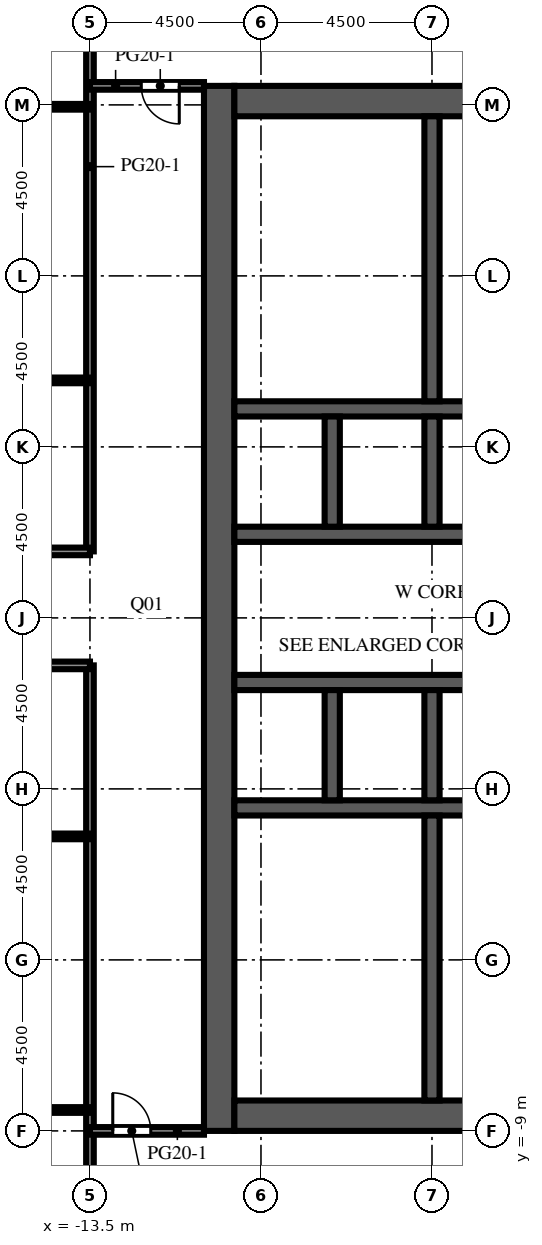
"""IFC4 building model, lengths in metres.
Left out: names, types, materials, properties, quantities, classifications, styles, units other than length and angle.
Written with IfcOpenShell. Run it as: python <this file> out.ifc"""

import sys

from ifc_helpers import new_model, si_unit, direction, frame, frame_2d, origin, place, context, subcontext, project, spatial, rectangle, extrude, element, fill, save


model = new_model("IFC4")
c1 = context("Model", 3, precision=1e-05, world=origin(), true_north=direction((0.0, 1.0)))
c2 = subcontext(c1, "Body", "Model", "MODEL_VIEW")
j1 = project(units=[si_unit("LENGTHUNIT", "METRE"), si_unit("PLANEANGLEUNIT", "RADIAN")], contexts=[c1])
p1 = place(None, origin())
s1 = spatial("IfcSite", under=j1, at=p1, CompositionType="ELEMENT")
p2 = place(p1, origin())
s2 = spatial("IfcBuilding", under=s1, at=p2, CompositionType="ELEMENT")
p3 = place(p2, frame((0.0, 0.0, 160.9)))
s3 = spatial("IfcBuildingStorey", under=s2, at=p3, CompositionType="ELEMENT", Elevation=160.9)
p4 = place(p3, frame((-10.1, -9.0, 0.0), z_axis=(0.0, 0.0, 1.0), x_axis=(0.0, 1.0, 0.0)))
e1 = element("IfcWall", 1, at=p4, inside=s3, PredefinedType="SHEAR", context=c2, shape_type="SweptSolid", body=[
    extrude(rectangle(XDim=27.5, YDim=0.8, at=frame_2d((13.75, 0.0))), origin(), (0.0, 0.0, 1.0), 4.1),
])
p5 = place(p4, frame((12.55, 0.0, 0.0)))
e2 = element("IfcOpeningElement", 2, at=p5, cuts=e1, PredefinedType="OPENING", context=c2, shape_type="SweptSolid", body=[
    extrude(rectangle(XDim=2.4, YDim=2.4, at=frame_2d((1.2, 1.2))), frame((0.0, 0.41, 0.0), z_axis=(0.0, -1.0, 0.0), x_axis=(1.0, 0.0, 0.0)), (0.0, 0.0, 1.0), 0.82),
])
p6 = place(p4, frame((6.825, 0.0, 0.0)))
e3 = element("IfcOpeningElement", 3, at=p6, cuts=e1, PredefinedType="OPENING", context=c2, shape_type="SweptSolid", body=[
    extrude(rectangle(XDim=1.2, YDim=2.1, at=frame_2d((0.6, 1.05))), frame((0.0, 0.41, 0.0), z_axis=(0.0, -1.0, 0.0), x_axis=(1.0, 0.0, 0.0)), (0.0, 0.0, 1.0), 0.82),
])
p7 = place(p4, frame((19.475, 0.0, 0.0)))
e4 = element("IfcOpeningElement", 4, at=p7, cuts=e1, PredefinedType="OPENING", context=c2, shape_type="SweptSolid", body=[
    extrude(rectangle(XDim=1.2, YDim=2.1, at=frame_2d((0.6, 1.05))), frame((0.0, 0.41, 0.0), z_axis=(0.0, -1.0, 0.0), x_axis=(1.0, 0.0, 0.0)), (0.0, 0.0, 1.0), 0.82),
])
for number, where, z_axis, x_axis in (
    (5, (-9.7, -8.6, 0.0), (0.0, 0.0, 1.0), (1.0, 0.0, 0.0)),
    (6, (-9.7, 18.1, 0.0), (0.0, 0.0, 1.0), (1.0, 0.0, 0.0)),
):
    element("IfcWall", number, at=place(p3, frame(where, z_axis=z_axis, x_axis=x_axis)), inside=s3, PredefinedType="SHEAR", context=c2, shape_type="SweptSolid", body=[
        extrude(rectangle(XDim=10.4, YDim=0.8, at=frame_2d((5.2, 0.0))), origin(), (0.0, 0.0, 1.0), 4.1),
    ])
p8 = place(p3, frame((-9.7, -0.5, 0.0), z_axis=(0.0, 0.0, 1.0), x_axis=(1.0, 0.0, 0.0)))
e7 = element("IfcWall", 7, at=p8, inside=s3, PredefinedType="SHEAR", context=c2, shape_type="SweptSolid", body=[
    extrude(rectangle(XDim=10.4, YDim=0.4, at=frame_2d((5.2, 0.0))), origin(), (0.0, 0.0, 1.0), 4.1),
])
p9 = place(p3, frame((-9.7, 2.8, 0.0), z_axis=(0.0, 0.0, 1.0), x_axis=(1.0, 0.0, 0.0)))
e8 = element("IfcWall", 8, at=p9, inside=s3, PredefinedType="SHEAR", context=c2, shape_type="SweptSolid", body=[
    extrude(rectangle(XDim=10.4, YDim=0.4, at=frame_2d((5.2, 0.0))), origin(), (0.0, 0.0, 1.0), 4.1),
])
p10 = place(p9, frame((0.738, 0.0, 0.0)))
e9 = element("IfcOpeningElement", 9, at=p10, cuts=e8, PredefinedType="OPENING", context=c2, shape_type="SweptSolid", body=[
    extrude(rectangle(XDim=1.1, YDim=2.1, at=frame_2d((0.55, 1.05))), frame((0.0, 0.21, 0.0), z_axis=(0.0, -1.0, 0.0), x_axis=(1.0, 0.0, 0.0)), (0.0, 0.0, 1.0), 0.42),
])
p11 = place(p9, frame((3.337, 0.0, 0.0)))
e10 = element("IfcOpeningElement", 10, at=p11, cuts=e8, PredefinedType="OPENING", context=c2, shape_type="SweptSolid", body=[
    extrude(rectangle(XDim=1.1, YDim=2.1, at=frame_2d((0.55, 1.05))), frame((0.0, 0.21, 0.0), z_axis=(0.0, -1.0, 0.0), x_axis=(1.0, 0.0, 0.0)), (0.0, 0.0, 1.0), 0.42),
])
p12 = place(p9, frame((6.012, 0.0, 0.0)))
e11 = element("IfcOpeningElement", 11, at=p12, cuts=e8, PredefinedType="OPENING", context=c2, shape_type="SweptSolid", body=[
    extrude(rectangle(XDim=1.0, YDim=2.1, at=frame_2d((0.5, 1.05))), frame((0.0, 0.21, 0.0), z_axis=(0.0, -1.0, 0.0), x_axis=(1.0, 0.0, 0.0)), (0.0, 0.0, 1.0), 0.42),
])
p13 = place(p9, frame((8.613, 0.0, 0.0)))
e12 = element("IfcOpeningElement", 12, at=p13, cuts=e8, PredefinedType="OPENING", context=c2, shape_type="SweptSolid", body=[
    extrude(rectangle(XDim=1.0, YDim=2.1, at=frame_2d((0.5, 1.05))), frame((0.0, 0.21, 0.0), z_axis=(0.0, -1.0, 0.0), x_axis=(1.0, 0.0, 0.0)), (0.0, 0.0, 1.0), 0.42),
])
p14 = place(p3, frame((-9.7, 6.7, 0.0), z_axis=(0.0, 0.0, 1.0), x_axis=(1.0, 0.0, 0.0)))
e13 = element("IfcWall", 13, at=p14, inside=s3, PredefinedType="SHEAR", context=c2, shape_type="SweptSolid", body=[
    extrude(rectangle(XDim=10.4, YDim=0.4, at=frame_2d((5.2, 0.0))), origin(), (0.0, 0.0, 1.0), 4.1),
])
p15 = place(p14, frame((3.337, 0.0, 0.0)))
e14 = element("IfcOpeningElement", 14, at=p15, cuts=e13, PredefinedType="OPENING", context=c2, shape_type="SweptSolid", body=[
    extrude(rectangle(XDim=1.1, YDim=2.1, at=frame_2d((0.55, 1.05))), frame((0.0, 0.21, 0.0), z_axis=(0.0, -1.0, 0.0), x_axis=(1.0, 0.0, 0.0)), (0.0, 0.0, 1.0), 0.42),
])
p16 = place(p14, frame((5.962, 0.0, 0.0)))
e15 = element("IfcOpeningElement", 15, at=p16, cuts=e13, PredefinedType="OPENING", context=c2, shape_type="SweptSolid", body=[
    extrude(rectangle(XDim=1.1, YDim=2.1, at=frame_2d((0.55, 1.05))), frame((0.0, 0.21, 0.0), z_axis=(0.0, -1.0, 0.0), x_axis=(1.0, 0.0, 0.0)), (0.0, 0.0, 1.0), 0.42),
])
p17 = place(p14, frame((8.663, 0.0, 0.0)))
e16 = element("IfcOpeningElement", 16, at=p17, cuts=e13, PredefinedType="OPENING", context=c2, shape_type="SweptSolid", body=[
    extrude(rectangle(XDim=1.1, YDim=2.1, at=frame_2d((0.55, 1.05))), frame((0.0, 0.21, 0.0), z_axis=(0.0, -1.0, 0.0), x_axis=(1.0, 0.0, 0.0)), (0.0, 0.0, 1.0), 0.42),
])
p18 = place(p14, frame((0.688, 0.0, 0.0)))
e17 = element("IfcOpeningElement", 17, at=p18, cuts=e13, PredefinedType="OPENING", context=c2, shape_type="SweptSolid", body=[
    extrude(rectangle(XDim=1.0, YDim=2.1, at=frame_2d((0.5, 1.05))), frame((0.0, 0.21, 0.0), z_axis=(0.0, -1.0, 0.0), x_axis=(1.0, 0.0, 0.0)), (0.0, 0.0, 1.0), 0.42),
])
p19 = place(p3, frame((-9.7, 10.0, 0.0), z_axis=(0.0, 0.0, 1.0), x_axis=(1.0, 0.0, 0.0)))
e18 = element("IfcWall", 18, at=p19, inside=s3, PredefinedType="SHEAR", context=c2, shape_type="SweptSolid", body=[
    extrude(rectangle(XDim=10.4, YDim=0.4, at=frame_2d((5.2, 0.0))), origin(), (0.0, 0.0, 1.0), 4.1),
])
for number, where, z_axis, x_axis in (
    (19, (-7.125, -0.3, 0.0), (0.0, 0.0, 1.0), (0.0, 1.0, 0.0)),
    (20, (-7.125, 6.9, 0.0), (0.0, 0.0, 1.0), (0.0, 1.0, 0.0)),
    (21, (-4.5, -0.3, 0.0), (0.0, 0.0, 1.0), (0.0, 1.0, 0.0)),
    (22, (-4.5, 6.9, 0.0), (0.0, 0.0, 1.0), (0.0, 1.0, 0.0)),
):
    element("IfcWall", number, at=place(p3, frame(where, z_axis=z_axis, x_axis=x_axis)), inside=s3, PredefinedType="SHEAR", context=c2, shape_type="SweptSolid", body=[
        extrude(rectangle(XDim=2.9, YDim=0.4, at=frame_2d((1.45, 0.0))), origin(), (0.0, 0.0, 1.0), 4.1),
    ])
for number, where, z_axis, x_axis in (
    (23, (-4.5, -8.2, 0.0), (0.0, 0.0, 1.0), (0.0, 1.0, 0.0)),
    (24, (-4.5, 10.2, 0.0), (0.0, 0.0, 1.0), (0.0, 1.0, 0.0)),
):
    element("IfcWall", number, at=place(p3, frame(where, z_axis=z_axis, x_axis=x_axis)), inside=s3, PredefinedType="SHEAR", context=c2, shape_type="SweptSolid", body=[
        extrude(rectangle(XDim=7.5, YDim=0.4, at=frame_2d((3.75, 0.0))), origin(), (0.0, 0.0, 1.0), 4.1),
    ])
for number, where, z_axis, x_axis in (
    (25, (-4.3, -5.2, 0.0), (0.0, 0.0, 1.0), (1.0, 0.0, 0.0)),
    (26, (-4.3, -2.95, 0.0), (0.0, 0.0, 1.0), (1.0, 0.0, 0.0)),
):
    element("IfcWall", number, at=place(p3, frame(where, z_axis=z_axis, x_axis=x_axis)), inside=s3, PredefinedType="PARTITIONING", context=c2, shape_type="SweptSolid", body=[
        extrude(rectangle(XDim=3.5, YDim=0.1, at=frame_2d((1.75, 0.0))), origin(), (0.0, 0.0, 1.0), 3.65),
    ])
for number, where, z_axis, x_axis in (
    (27, (-4.3, 11.7, 0.0), (0.0, 0.0, 1.0), (1.0, 0.0, 0.0)),
    (28, (-4.3, 13.575, 0.0), (0.0, 0.0, 1.0), (1.0, 0.0, 0.0)),
    (29, (-4.3, 15.825, 0.0), (0.0, 0.0, 1.0), (1.0, 0.0, 0.0)),
):
    element("IfcWall", number, at=place(p3, frame(where, z_axis=z_axis, x_axis=x_axis)), inside=s3, PredefinedType="PARTITIONING", context=c2, shape_type="SweptSolid", body=[
        extrude(rectangle(XDim=5.0, YDim=0.1, at=frame_2d((2.5, 0.0))), origin(), (0.0, 0.0, 1.0), 3.65),
    ])
p20 = place(p3, frame((-13.5, -26.5, 0.0), z_axis=(0.0, 0.0, 1.0), x_axis=(0.0, 1.0, 0.0)))
e30 = element("IfcWall", 30, at=p20, inside=s3, PredefinedType="PARTITIONING", context=c2, shape_type="SweptSolid", body=[
    extrude(rectangle(XDim=29.75, YDim=0.2, at=frame_2d((14.875, 0.0))), origin(), (0.0, 0.0, 1.0), 3.65),
])
p21 = place(p3, frame((-13.5, 6.25, 0.0), z_axis=(0.0, 0.0, 1.0), x_axis=(0.0, 1.0, 0.0)))
e31 = element("IfcWall", 31, at=p21, inside=s3, PredefinedType="PARTITIONING", context=c2, shape_type="SweptSolid", body=[
    extrude(rectangle(XDim=20.25, YDim=0.2, at=frame_2d((10.125, 0.0))), origin(), (0.0, 0.0, 1.0), 3.65),
])
p22 = place(p3, frame((-10.5, -9.0, 0.0), z_axis=(0.0, 0.0, 1.0), x_axis=(-1.0, 0.0, 0.0)))
e32 = element("IfcWall", 32, at=p22, inside=s3, PredefinedType="PARTITIONING", context=c2, shape_type="SweptSolid", body=[
    extrude(rectangle(XDim=3.0, YDim=0.2, at=frame_2d((1.5, 0.0))), origin(), (0.0, 0.0, 1.0), 3.65),
])
p23 = place(p22, frame((1.4, 0.0, 0.0)))
e33 = element("IfcOpeningElement", 33, at=p23, cuts=e32, PredefinedType="OPENING", context=c2, shape_type="SweptSolid", body=[
    extrude(rectangle(XDim=1.0, YDim=2.1, at=frame_2d((0.5, 1.05))), frame((0.0, 0.11, 0.0), z_axis=(0.0, -1.0, 0.0), x_axis=(1.0, 0.0, 0.0)), (0.0, 0.0, 1.0), 0.22),
])
p24 = place(p3, frame((-17.4, -8.45, 0.0), z_axis=(0.0, 0.0, 1.0), x_axis=(1.0, 0.0, 0.0)))
e34 = element("IfcWall", 34, at=p24, inside=s3, PredefinedType="PARTITIONING", context=c2, shape_type="SweptSolid", body=[
    extrude(rectangle(XDim=3.9, YDim=0.15, at=frame_2d((1.95, 0.0))), origin(), (0.0, 0.0, 1.0), 3.65),
])
p25 = place(p3, frame((-13.5, -1.25, 0.0), z_axis=(0.0, 0.0, 1.0), x_axis=(-1.0, 0.0, 0.0)))
e35 = element("IfcWall", 35, at=p25, inside=s3, PredefinedType="PARTITIONING", context=c2, shape_type="SweptSolid", body=[
    extrude(rectangle(XDim=13.35, YDim=0.15, at=frame_2d((6.675, 0.0))), origin(), (0.0, 0.0, 1.0), 3.65),
])
p26 = place(p25, frame((6.9, 0.0, 0.0)))
e36 = element("IfcOpeningElement", 36, at=p26, cuts=e35, PredefinedType="OPENING", context=c2, shape_type="SweptSolid", body=[
    extrude(rectangle(XDim=1.0, YDim=2.1, at=frame_2d((0.5, 1.05))), frame((0.0, 0.085, 0.0), z_axis=(0.0, -1.0, 0.0), x_axis=(1.0, 0.0, 0.0)), (0.0, 0.0, 1.0), 0.17),
])
p27 = place(p3, frame((-13.5, 3.25, 0.0), z_axis=(0.0, 0.0, 1.0), x_axis=(-1.0, 0.0, 0.0)))
e37 = element("IfcWall", 37, at=p27, inside=s3, PredefinedType="PARTITIONING", context=c2, shape_type="SweptSolid", body=[
    extrude(rectangle(XDim=13.35, YDim=0.2, at=frame_2d((6.675, 0.0))), origin(), (0.0, 0.0, 1.0), 3.65),
])
p28 = place(p27, frame((6.9, 0.0, 0.0)))
e38 = element("IfcOpeningElement", 38, at=p28, cuts=e37, PredefinedType="OPENING", context=c2, shape_type="SweptSolid", body=[
    extrude(rectangle(XDim=1.0, YDim=2.1, at=frame_2d((0.5, 1.05))), frame((0.0, 0.11, 0.0), z_axis=(0.0, -1.0, 0.0), x_axis=(1.0, 0.0, 0.0)), (0.0, 0.0, 1.0), 0.22),
])
p29 = place(p3, frame((-26.85, 6.25, 0.0), z_axis=(0.0, 0.0, 1.0), x_axis=(1.0, 0.0, 0.0)))
e39 = element("IfcWall", 39, at=p29, inside=s3, PredefinedType="PARTITIONING", context=c2, shape_type="SweptSolid", body=[
    extrude(rectangle(XDim=13.35, YDim=0.2, at=frame_2d((6.675, 0.0))), origin(), (0.0, 0.0, 1.0), 3.65),
])
p30 = place(p29, frame((4.45, 0.0, 0.0)))
e40 = element("IfcOpeningElement", 40, at=p30, cuts=e39, PredefinedType="OPENING", context=c2, shape_type="SweptSolid", body=[
    extrude(rectangle(XDim=1.0, YDim=2.1, at=frame_2d((0.5, 1.05))), frame((0.0, 0.11, 0.0), z_axis=(0.0, -1.0, 0.0), x_axis=(1.0, 0.0, 0.0)), (0.0, 0.0, 1.0), 0.22),
])
p31 = place(p3, frame((-26.85, 10.75, 0.0), z_axis=(0.0, 0.0, 1.0), x_axis=(1.0, 0.0, 0.0)))
e41 = element("IfcWall", 41, at=p31, inside=s3, PredefinedType="PARTITIONING", context=c2, shape_type="SweptSolid", body=[
    extrude(rectangle(XDim=13.35, YDim=0.15, at=frame_2d((6.675, 0.0))), origin(), (0.0, 0.0, 1.0), 3.65),
])
p32 = place(p31, frame((6.7, 0.0, 0.0)))
e42 = element("IfcOpeningElement", 42, at=p32, cuts=e41, PredefinedType="OPENING", context=c2, shape_type="SweptSolid", body=[
    extrude(rectangle(XDim=1.0, YDim=2.1, at=frame_2d((0.5, 1.05))), frame((0.0, 0.085, 0.0), z_axis=(0.0, -1.0, 0.0), x_axis=(1.0, 0.0, 0.0)), (0.0, 0.0, 1.0), 0.17),
])
p33 = place(p3, frame((-17.4, 17.95, 0.0), z_axis=(0.0, 0.0, 1.0), x_axis=(1.0, 0.0, 0.0)))
e43 = element("IfcWall", 43, at=p33, inside=s3, PredefinedType="PARTITIONING", context=c2, shape_type="SweptSolid", body=[
    extrude(rectangle(XDim=3.9, YDim=0.15, at=frame_2d((1.95, 0.0))), origin(), (0.0, 0.0, 1.0), 3.65),
])
p34 = place(p3, frame((-13.5, 18.5, 0.0), z_axis=(0.0, 0.0, 1.0), x_axis=(1.0, 0.0, 0.0)))
e44 = element("IfcWall", 44, at=p34, inside=s3, PredefinedType="PARTITIONING", context=c2, shape_type="SweptSolid", body=[
    extrude(rectangle(XDim=3.0, YDim=0.2, at=frame_2d((1.5, 0.0))), origin(), (0.0, 0.0, 1.0), 3.65),
])
p35 = place(p34, frame((1.35, 0.0, 0.0)))
e45 = element("IfcOpeningElement", 45, at=p35, cuts=e44, PredefinedType="OPENING", context=c2, shape_type="SweptSolid", body=[
    extrude(rectangle(XDim=1.0, YDim=2.1, at=frame_2d((0.5, 1.05))), frame((0.0, 0.11, 0.0), z_axis=(0.0, -1.0, 0.0), x_axis=(1.0, 0.0, 0.0)), (0.0, 0.0, 1.0), 0.22),
])
p36 = place(p10, origin())
e46 = element("IfcDoor", 46, at=p36, inside=s3, OperationType="DOUBLE_DOOR_SLIDING", PredefinedType="DOOR", context=c2, shape_type="SweptSolid", body=[
    extrude(rectangle(XDim=1.1, YDim=2.1, at=frame_2d((0.55, 1.05))), frame((0.0, 0.025, 0.0), z_axis=(0.0, -1.0, 0.0), x_axis=(1.0, 0.0, 0.0)), (0.0, 0.0, 1.0), 0.05),
])
fill(e9, e46)
p37 = place(p11, origin())
e47 = element("IfcDoor", 47, at=p37, inside=s3, OperationType="DOUBLE_DOOR_SLIDING", PredefinedType="DOOR", context=c2, shape_type="SweptSolid", body=[
    extrude(rectangle(XDim=1.1, YDim=2.1, at=frame_2d((0.55, 1.05))), frame((0.0, 0.025, 0.0), z_axis=(0.0, -1.0, 0.0), x_axis=(1.0, 0.0, 0.0)), (0.0, 0.0, 1.0), 0.05),
])
fill(e10, e47)
p38 = place(p15, origin())
e48 = element("IfcDoor", 48, at=p38, inside=s3, OperationType="DOUBLE_DOOR_SLIDING", PredefinedType="DOOR", context=c2, shape_type="SweptSolid", body=[
    extrude(rectangle(XDim=1.1, YDim=2.1, at=frame_2d((0.55, 1.05))), frame((0.0, 0.025, 0.0), z_axis=(0.0, -1.0, 0.0), x_axis=(1.0, 0.0, 0.0)), (0.0, 0.0, 1.0), 0.05),
])
fill(e14, e48)
p39 = place(p16, origin())
e49 = element("IfcDoor", 49, at=p39, inside=s3, OperationType="DOUBLE_DOOR_SLIDING", PredefinedType="DOOR", context=c2, shape_type="SweptSolid", body=[
    extrude(rectangle(XDim=1.1, YDim=2.1, at=frame_2d((0.55, 1.05))), frame((0.0, 0.025, 0.0), z_axis=(0.0, -1.0, 0.0), x_axis=(1.0, 0.0, 0.0)), (0.0, 0.0, 1.0), 0.05),
])
fill(e15, e49)
p40 = place(p5, origin())
e50 = element("IfcDoor", 50, at=p40, inside=s3, OperationType="DOUBLE_DOOR_DOUBLE_SWING", PredefinedType="DOOR", context=c2, shape_type="SweptSolid", body=[
    extrude(rectangle(XDim=2.4, YDim=2.4, at=frame_2d((1.2, 1.2))), frame((0.0, 0.025, 0.0), z_axis=(0.0, -1.0, 0.0), x_axis=(1.0, 0.0, 0.0)), (0.0, 0.0, 1.0), 0.05),
])
fill(e2, e50)
p41 = place(p6, origin())
e51 = element("IfcDoor", 51, at=p41, inside=s3, OperationType="SINGLE_SWING_LEFT", PredefinedType="DOOR", context=c2, shape_type="SweptSolid", body=[
    extrude(rectangle(XDim=1.2, YDim=2.1, at=frame_2d((0.6, 1.05))), frame((0.0, 0.025, 0.0), z_axis=(0.0, -1.0, 0.0), x_axis=(1.0, 0.0, 0.0)), (0.0, 0.0, 1.0), 0.05),
])
fill(e3, e51)
p42 = place(p7, origin())
e52 = element("IfcDoor", 52, at=p42, inside=s3, OperationType="SINGLE_SWING_LEFT", PredefinedType="DOOR", context=c2, shape_type="SweptSolid", body=[
    extrude(rectangle(XDim=1.2, YDim=2.1, at=frame_2d((0.6, 1.05))), frame((0.0, 0.025, 0.0), z_axis=(0.0, -1.0, 0.0), x_axis=(1.0, 0.0, 0.0)), (0.0, 0.0, 1.0), 0.05),
])
fill(e4, e52)
p43 = place(p18, origin())
e53 = element("IfcDoor", 53, at=p43, inside=s3, OperationType="SINGLE_SWING_LEFT", PredefinedType="DOOR", context=c2, shape_type="SweptSolid", body=[
    extrude(rectangle(XDim=1.0, YDim=2.1, at=frame_2d((0.5, 1.05))), frame((0.0, 0.025, 0.0), z_axis=(0.0, -1.0, 0.0), x_axis=(1.0, 0.0, 0.0)), (0.0, 0.0, 1.0), 0.05),
])
fill(e17, e53)
p44 = place(p23, origin())
e54 = element("IfcDoor", 54, at=p44, inside=s3, OperationType="SINGLE_SWING_RIGHT", PredefinedType="DOOR", context=c2, shape_type="SweptSolid", body=[
    extrude(rectangle(XDim=1.0, YDim=2.1, at=frame_2d((0.5, 1.05))), frame((0.0, 0.025, 0.0), z_axis=(0.0, -1.0, 0.0), x_axis=(1.0, 0.0, 0.0)), (0.0, 0.0, 1.0), 0.05),
])
fill(e33, e54)
p45 = place(p35, origin())
e55 = element("IfcDoor", 55, at=p45, inside=s3, OperationType="SINGLE_SWING_RIGHT", PredefinedType="DOOR", context=c2, shape_type="SweptSolid", body=[
    extrude(rectangle(XDim=1.0, YDim=2.1, at=frame_2d((0.5, 1.05))), frame((0.0, 0.025, 0.0), z_axis=(0.0, -1.0, 0.0), x_axis=(1.0, 0.0, 0.0)), (0.0, 0.0, 1.0), 0.05),
])
fill(e45, e55)
save(model, sys.argv[1])
